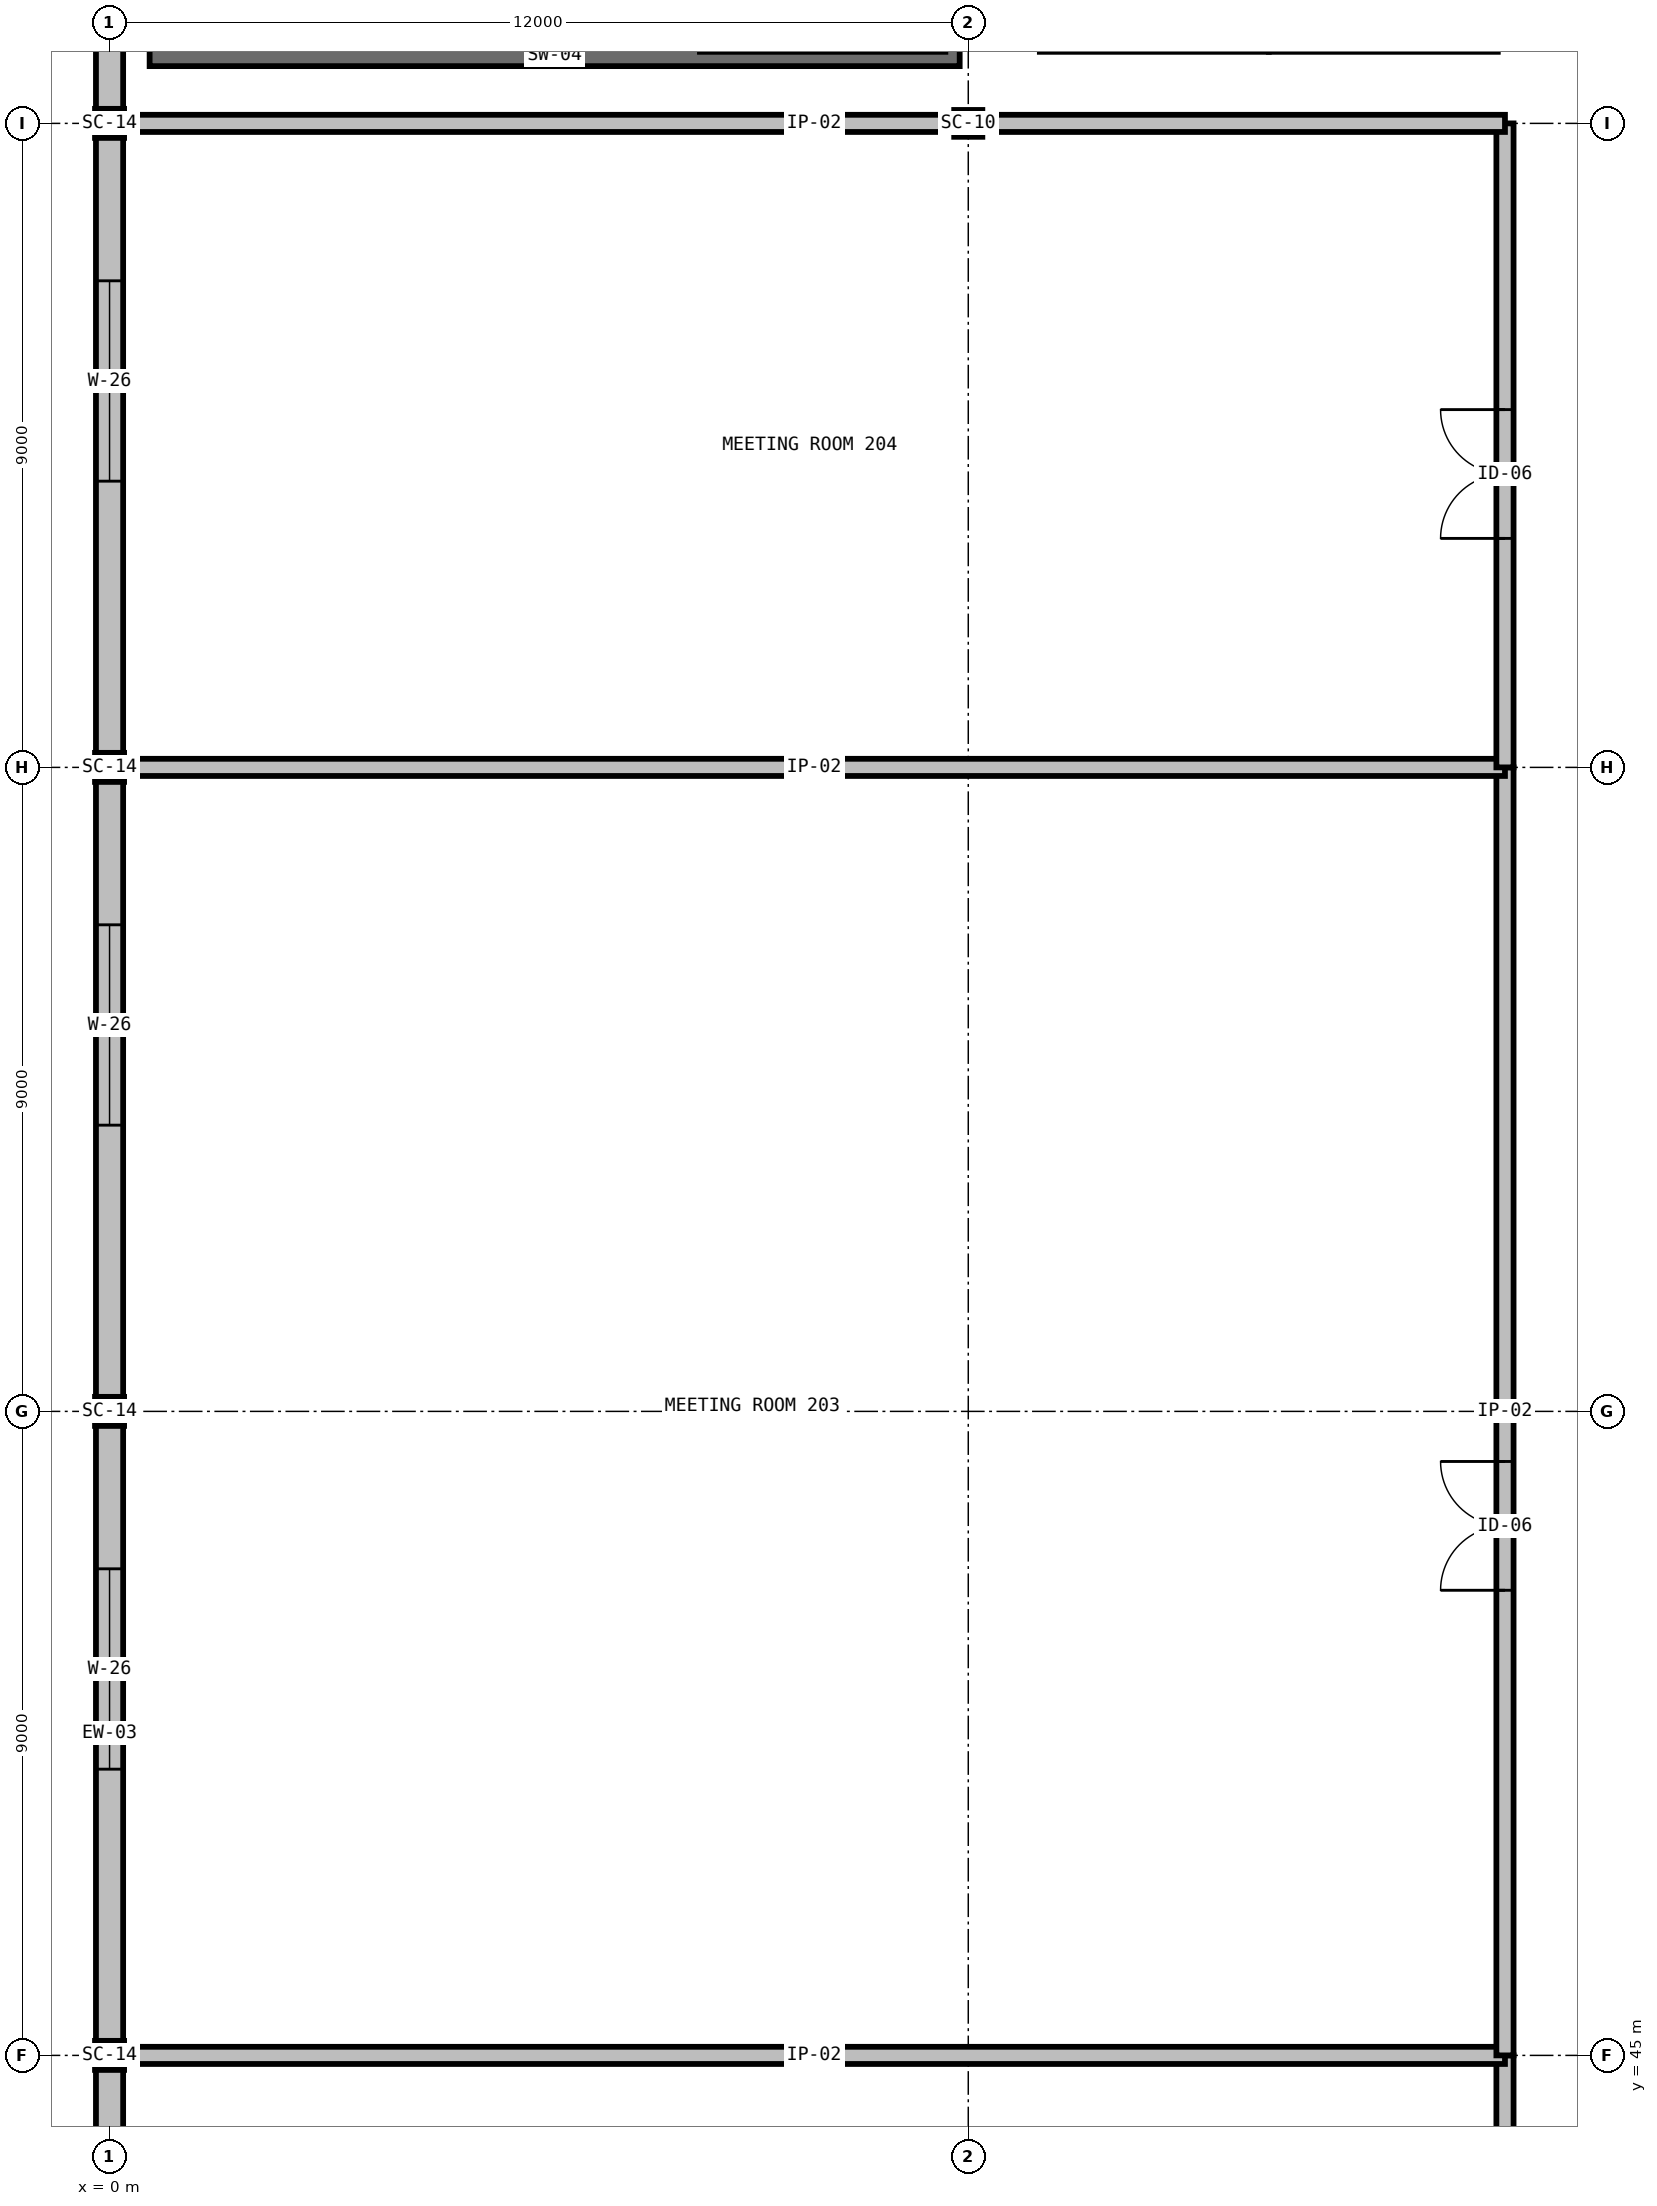
"""IFC4 building model, lengths in metres.
Left out: names, types, materials, properties, quantities, classifications, styles, units other than length and angle.
Written with IfcOpenShell. Run it as: python <this file> out.ifc"""

import sys

from ifc_helpers import new_model, si_unit, direction, frame, frame_2d, origin, origin_2d, place, context, subcontext, project, spatial, rectangle, hollow_rectangle, i_section, extrude, element, fill, save


model = new_model("IFC4")
c1 = context("Model", 3, precision=1e-05, world=origin(), true_north=direction((0.0, 1.0)))
c2 = subcontext(c1, "Body", "Model", "MODEL_VIEW")
j1 = project(units=[si_unit("LENGTHUNIT", "METRE"), si_unit("PLANEANGLEUNIT", "RADIAN")], contexts=[c1])
p1 = place(None, origin())
s1 = spatial("IfcSite", under=j1, at=p1, CompositionType="ELEMENT")
p2 = place(p1, origin())
s2 = spatial("IfcBuilding", under=s1, at=p2, CompositionType="ELEMENT")
p3 = place(p2, frame((0.0, 0.0, 12.0)))
s3 = spatial("IfcBuildingStorey", under=s2, at=p3, CompositionType="ELEMENT", Elevation=12.0)
for number, where, z_axis, x_axis in (
    (1, (0.0, 45.0, 0.0), (0.0, 0.0, 1.0), (1.0, 0.0, 0.0)),
    (2, (0.0, 54.0, 0.0), (0.0, 0.0, 1.0), (1.0, 0.0, 0.0)),
    (3, (0.0, 63.0, 0.0), (0.0, 0.0, 1.0), (1.0, 0.0, 0.0)),
    (4, (0.0, 72.0, 0.0), (0.0, 0.0, 1.0), (1.0, 0.0, 0.0)),
):
    element("IfcColumn", number, at=place(p3, frame(where, z_axis=z_axis, x_axis=x_axis)), inside=s3, PredefinedType="COLUMN", context=c2, shape_type="SweptSolid", body=[
        extrude(hollow_rectangle(XDim=0.406, YDim=0.406, WallThickness=0.015, at=origin_2d()), origin(), (0.0, 0.0, 1.0), 6.0),
    ])
p4 = place(p3, frame((12.0, 72.0, 0.0), z_axis=(0.0, 0.0, 1.0), x_axis=(1.0, 0.0, 0.0)))
e5 = element("IfcColumn", 5, at=p4, inside=s3, PredefinedType="COLUMN", context=c2, shape_type="SweptSolid", body=[
    extrude(i_section(OverallWidth=0.394, OverallDepth=0.375, WebThickness=0.017, FlangeThickness=0.028, FilletRadius=0.031, at=origin_2d()), origin(), (0.0, 0.0, 1.0), 6.0),
])
p5 = place(p3, frame((0.56, 72.95, 0.0), z_axis=(0.0, 0.0, 1.0), x_axis=(1.0, 0.0, 0.0)))
e6 = element("IfcWall", 6, at=p5, inside=s3, PredefinedType="SHEAR", context=c2, shape_type="SweptSolid", body=[
    extrude(rectangle(XDim=11.32, YDim=0.3, at=frame_2d((5.66, 0.0))), origin(), (0.0, 0.0, 1.0), 6.0),
])
p6 = place(p3, frame((0.0, 45.0, 0.0), z_axis=(0.0, 0.0, 1.0), x_axis=(0.0, -1.0, 0.0)))
e7 = element("IfcWall", 7, at=p6, inside=s3, PredefinedType="STANDARD", context=c2, shape_type="SweptSolid", body=[
    extrude(rectangle(XDim=9.0, YDim=0.38, at=frame_2d((4.5, 0.0))), origin(), (0.0, 0.0, 1.0), 5.239),
])
p7 = place(p6, frame((2.2, 0.0, 1.0)))
e8 = element("IfcOpeningElement", 8, at=p7, cuts=e7, PredefinedType="OPENING", context=c2, shape_type="SweptSolid", body=[
    extrude(rectangle(XDim=2.8, YDim=1.0, at=frame_2d((1.4, 0.5))), frame((0.0, 0.205, 0.0), z_axis=(0.0, -1.0, 0.0), x_axis=(1.0, 0.0, 0.0)), (0.0, 0.0, 1.0), 0.41),
])
p8 = place(p3, frame((0.0, 54.0, 0.0), z_axis=(0.0, 0.0, 1.0), x_axis=(0.0, -1.0, 0.0)))
e9 = element("IfcWall", 9, at=p8, inside=s3, PredefinedType="STANDARD", context=c2, shape_type="SweptSolid", body=[
    extrude(rectangle(XDim=9.0, YDim=0.38, at=frame_2d((4.5, 0.0))), origin(), (0.0, 0.0, 1.0), 5.239),
])
p9 = place(p8, frame((2.2, 0.0, 1.0)))
e10 = element("IfcOpeningElement", 10, at=p9, cuts=e9, PredefinedType="OPENING", context=c2, shape_type="SweptSolid", body=[
    extrude(rectangle(XDim=2.8, YDim=1.0, at=frame_2d((1.4, 0.5))), frame((0.0, 0.205, 0.0), z_axis=(0.0, -1.0, 0.0), x_axis=(1.0, 0.0, 0.0)), (0.0, 0.0, 1.0), 0.41),
])
p10 = place(p3, frame((0.0, 63.0, 0.0), z_axis=(0.0, 0.0, 1.0), x_axis=(0.0, -1.0, 0.0)))
e11 = element("IfcWall", 11, at=p10, inside=s3, PredefinedType="STANDARD", context=c2, shape_type="SweptSolid", body=[
    extrude(rectangle(XDim=9.0, YDim=0.38, at=frame_2d((4.5, 0.0))), origin(), (0.0, 0.0, 1.0), 5.239),
])
p11 = place(p10, frame((2.2, 0.0, 1.0)))
e12 = element("IfcOpeningElement", 12, at=p11, cuts=e11, PredefinedType="OPENING", context=c2, shape_type="SweptSolid", body=[
    extrude(rectangle(XDim=2.8, YDim=1.0, at=frame_2d((1.4, 0.5))), frame((0.0, 0.205, 0.0), z_axis=(0.0, -1.0, 0.0), x_axis=(1.0, 0.0, 0.0)), (0.0, 0.0, 1.0), 0.41),
])
p12 = place(p3, frame((0.0, 72.0, 0.0), z_axis=(0.0, 0.0, 1.0), x_axis=(0.0, -1.0, 0.0)))
e13 = element("IfcWall", 13, at=p12, inside=s3, PredefinedType="STANDARD", context=c2, shape_type="SweptSolid", body=[
    extrude(rectangle(XDim=9.0, YDim=0.38, at=frame_2d((4.5, 0.0))), origin(), (0.0, 0.0, 1.0), 5.239),
])
p13 = place(p12, frame((2.2, 0.0, 1.0)))
e14 = element("IfcOpeningElement", 14, at=p13, cuts=e13, PredefinedType="OPENING", context=c2, shape_type="SweptSolid", body=[
    extrude(rectangle(XDim=2.8, YDim=1.0, at=frame_2d((1.4, 0.5))), frame((0.0, 0.205, 0.0), z_axis=(0.0, -1.0, 0.0), x_axis=(1.0, 0.0, 0.0)), (0.0, 0.0, 1.0), 0.41),
])
p14 = place(p3, frame((0.0, 81.0, 0.0), z_axis=(0.0, 0.0, 1.0), x_axis=(0.0, -1.0, 0.0)))
e15 = element("IfcWall", 15, at=p14, inside=s3, PredefinedType="STANDARD", context=c2, shape_type="SweptSolid", body=[
    extrude(rectangle(XDim=9.0, YDim=0.38, at=frame_2d((4.5, 0.0))), origin(), (0.0, 0.0, 1.0), 5.239),
])
p15 = place(p14, frame((2.2, 0.0, 1.0)))
e16 = element("IfcOpeningElement", 16, at=p15, cuts=e15, PredefinedType="OPENING", context=c2, shape_type="SweptSolid", body=[
    extrude(rectangle(XDim=2.8, YDim=1.0, at=frame_2d((1.4, 0.5))), frame((0.0, 0.205, 0.0), z_axis=(0.0, -1.0, 0.0), x_axis=(1.0, 0.0, 0.0)), (0.0, 0.0, 1.0), 0.41),
])
p16 = place(p3, frame((19.5, 27.0, 0.0), z_axis=(0.0, 0.0, 1.0), x_axis=(0.0, 1.0, 0.0)))
e17 = element("IfcWall", 17, at=p16, inside=s3, PredefinedType="PARTITIONING", context=c2, shape_type="SweptSolid", body=[
    extrude(rectangle(XDim=18.0, YDim=0.24, at=frame_2d((9.0, 0.0))), origin(), (0.0, 0.0, 1.0), 5.65),
])
p17 = place(p16, frame((6.5, 0.0, 0.0)))
e18 = element("IfcOpeningElement", 18, at=p17, cuts=e17, PredefinedType="OPENING", context=c2, shape_type="SweptSolid", body=[
    extrude(rectangle(XDim=1.8, YDim=2.3, at=frame_2d((0.9, 1.15))), frame((0.0, 0.135, 0.0), z_axis=(0.0, -1.0, 0.0), x_axis=(1.0, 0.0, 0.0)), (0.0, 0.0, 1.0), 0.27),
])
p18 = place(p3, frame((19.5, 45.0, 0.0), z_axis=(0.0, 0.0, 1.0), x_axis=(-1.0, 0.0, 0.0)))
e19 = element("IfcWall", 19, at=p18, inside=s3, PredefinedType="PARTITIONING", context=c2, shape_type="SweptSolid", body=[
    extrude(rectangle(XDim=19.31, YDim=0.24, at=frame_2d((9.655, 0.0))), origin(), (0.0, 0.0, 1.0), 4.528),
])
p19 = place(p3, frame((19.5, 45.0, 0.0), z_axis=(0.0, 0.0, 1.0), x_axis=(0.0, 1.0, 0.0)))
e20 = element("IfcWall", 20, at=p19, inside=s3, PredefinedType="PARTITIONING", context=c2, shape_type="SweptSolid", body=[
    extrude(rectangle(XDim=18.0, YDim=0.24, at=frame_2d((9.0, 0.0))), origin(), (0.0, 0.0, 1.0), 5.65),
])
p20 = place(p19, frame((6.5, 0.0, 0.0)))
e21 = element("IfcOpeningElement", 21, at=p20, cuts=e20, PredefinedType="OPENING", context=c2, shape_type="SweptSolid", body=[
    extrude(rectangle(XDim=1.8, YDim=2.3, at=frame_2d((0.9, 1.15))), frame((0.0, 0.135, 0.0), z_axis=(0.0, -1.0, 0.0), x_axis=(1.0, 0.0, 0.0)), (0.0, 0.0, 1.0), 0.27),
])
p21 = place(p3, frame((19.5, 63.0, 0.0), z_axis=(0.0, 0.0, 1.0), x_axis=(-1.0, 0.0, 0.0)))
e22 = element("IfcWall", 22, at=p21, inside=s3, PredefinedType="PARTITIONING", context=c2, shape_type="SweptSolid", body=[
    extrude(rectangle(XDim=19.31, YDim=0.24, at=frame_2d((9.655, 0.0))), origin(), (0.0, 0.0, 1.0), 4.528),
])
p22 = place(p3, frame((19.5, 63.0, 0.0), z_axis=(0.0, 0.0, 1.0), x_axis=(0.0, 1.0, 0.0)))
e23 = element("IfcWall", 23, at=p22, inside=s3, PredefinedType="PARTITIONING", context=c2, shape_type="SweptSolid", body=[
    extrude(rectangle(XDim=9.0, YDim=0.24, at=frame_2d((4.5, 0.0))), origin(), (0.0, 0.0, 1.0), 5.65),
])
p23 = place(p22, frame((3.2, 0.0, 0.0)))
e24 = element("IfcOpeningElement", 24, at=p23, cuts=e23, PredefinedType="OPENING", context=c2, shape_type="SweptSolid", body=[
    extrude(rectangle(XDim=1.8, YDim=2.3, at=frame_2d((0.9, 1.15))), frame((0.0, 0.135, 0.0), z_axis=(0.0, -1.0, 0.0), x_axis=(1.0, 0.0, 0.0)), (0.0, 0.0, 1.0), 0.27),
])
p24 = place(p3, frame((19.5, 72.0, 0.0), z_axis=(0.0, 0.0, 1.0), x_axis=(-1.0, 0.0, 0.0)))
e25 = element("IfcWall", 25, at=p24, inside=s3, PredefinedType="PARTITIONING", context=c2, shape_type="SweptSolid", body=[
    extrude(rectangle(XDim=19.31, YDim=0.24, at=frame_2d((9.655, 0.0))), origin(), (0.0, 0.0, 1.0), 4.872),
])
p25 = place(p9, origin())
e26 = element("IfcWindow", 26, at=p25, inside=s3, PartitioningType="DOUBLE_PANEL_HORIZONTAL", PredefinedType="WINDOW", context=c2, shape_type="SweptSolid", body=[
    extrude(rectangle(XDim=2.8, YDim=1.0, at=frame_2d((1.4, 0.5))), frame((0.0, 0.03, 0.0), z_axis=(0.0, -1.0, 0.0), x_axis=(1.0, 0.0, 0.0)), (0.0, 0.0, 1.0), 0.06),
])
fill(e10, e26)
p26 = place(p11, origin())
e27 = element("IfcWindow", 27, at=p26, inside=s3, PartitioningType="DOUBLE_PANEL_HORIZONTAL", PredefinedType="WINDOW", context=c2, shape_type="SweptSolid", body=[
    extrude(rectangle(XDim=2.8, YDim=1.0, at=frame_2d((1.4, 0.5))), frame((0.0, 0.03, 0.0), z_axis=(0.0, -1.0, 0.0), x_axis=(1.0, 0.0, 0.0)), (0.0, 0.0, 1.0), 0.06),
])
fill(e12, e27)
p27 = place(p13, origin())
e28 = element("IfcWindow", 28, at=p27, inside=s3, PartitioningType="DOUBLE_PANEL_HORIZONTAL", PredefinedType="WINDOW", context=c2, shape_type="SweptSolid", body=[
    extrude(rectangle(XDim=2.8, YDim=1.0, at=frame_2d((1.4, 0.5))), frame((0.0, 0.03, 0.0), z_axis=(0.0, -1.0, 0.0), x_axis=(1.0, 0.0, 0.0)), (0.0, 0.0, 1.0), 0.06),
])
fill(e14, e28)
p28 = place(p20, origin())
e29 = element("IfcDoor", 29, at=p28, inside=s3, OperationType="DOUBLE_DOOR_SINGLE_SWING", PredefinedType="DOOR", context=c2, shape_type="SweptSolid", body=[
    extrude(rectangle(XDim=1.8, YDim=2.3, at=frame_2d((0.9, 1.15))), frame((0.0, 0.025, 0.0), z_axis=(0.0, -1.0, 0.0), x_axis=(1.0, 0.0, 0.0)), (0.0, 0.0, 1.0), 0.05),
])
fill(e21, e29)
p29 = place(p23, origin())
e30 = element("IfcDoor", 30, at=p29, inside=s3, OperationType="DOUBLE_DOOR_SINGLE_SWING", PredefinedType="DOOR", context=c2, shape_type="SweptSolid", body=[
    extrude(rectangle(XDim=1.8, YDim=2.3, at=frame_2d((0.9, 1.15))), frame((0.0, 0.025, 0.0), z_axis=(0.0, -1.0, 0.0), x_axis=(1.0, 0.0, 0.0)), (0.0, 0.0, 1.0), 0.05),
])
fill(e24, e30)
save(model, sys.argv[1])
